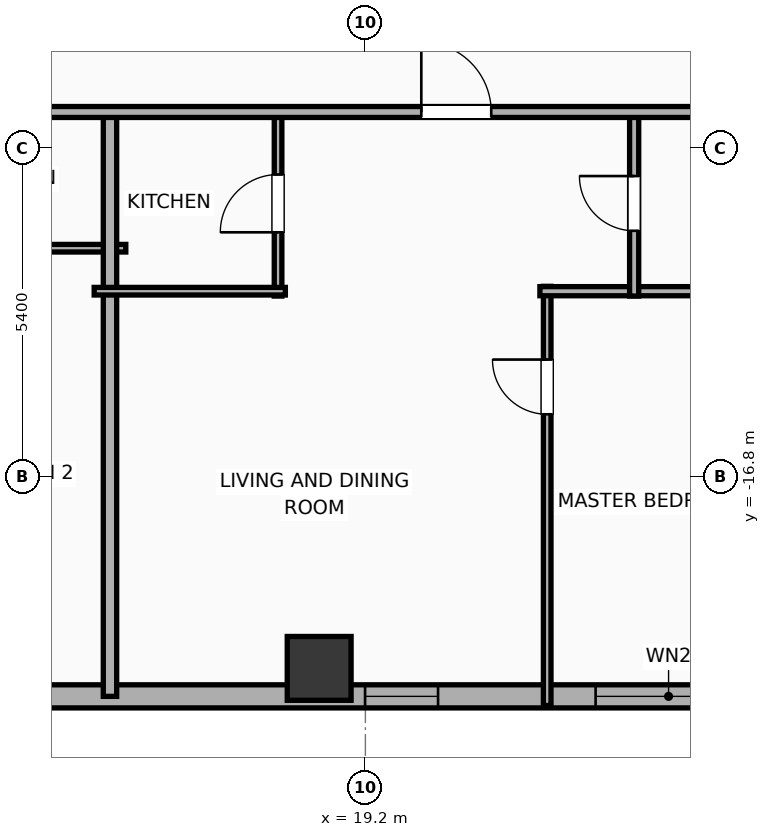
"""IFC4 building model, lengths in metres.
Left out: names, types, materials, properties, quantities, classifications, styles, units other than length and angle.
Written with IfcOpenShell. Run it as: python <this file> out.ifc"""

import sys

from ifc_helpers import new_model, si_unit, direction, frame, frame_2d, origin, origin_2d, place, context, subcontext, project, spatial, rectangle, hollow_rectangle, extrude, element, fill, save


model = new_model("IFC4")
c1 = context("Model", 3, precision=1e-05, world=origin(), true_north=direction((0.0, 1.0)))
c2 = subcontext(c1, "Body", "Model", "MODEL_VIEW")
j1 = project(units=[si_unit("LENGTHUNIT", "METRE"), si_unit("PLANEANGLEUNIT", "RADIAN")], contexts=[c1])
p1 = place(None, origin())
s1 = spatial("IfcSite", under=j1, at=p1, CompositionType="ELEMENT")
p2 = place(p1, origin())
s2 = spatial("IfcBuilding", under=s1, at=p2, CompositionType="ELEMENT")
p3 = place(p2, frame((0.0, 0.0, 109.2)))
s3 = spatial("IfcBuildingStorey", under=s2, at=p3, CompositionType="ELEMENT", Elevation=109.2)
p4 = place(p3, frame((18.44, -19.95, 0.0), z_axis=(0.0, 0.0, 1.0), x_axis=(1.0, 0.0, 0.0)))
e1 = element("IfcColumn", 1, at=p4, inside=s3, PredefinedType="COLUMN", context=c2, shape_type="SweptSolid", body=[
    extrude(hollow_rectangle(XDim=1.05, YDim=1.05, WallThickness=0.036, at=origin_2d()), origin(), (0.0, 0.0, 1.0), 3.9),
])
p5 = place(p3, frame((29.381, -20.41, 0.0), z_axis=(0.0, 0.0, 1.0), x_axis=(-1.0, 0.0, 0.0)))
e2 = element("IfcWall", 2, at=p5, inside=s3, PredefinedType="ELEMENTEDWALL", context=c2, shape_type="SweptSolid", body=[
    extrude(rectangle(XDim=54.763, YDim=0.38, at=frame_2d((27.381, 0.0))), origin(), (0.0, 0.0, 1.0), 3.65),
])
p6 = place(p5, frame((3.995, 0.0, 0.75)))
e3 = element("IfcOpeningElement", 3, at=p6, cuts=e2, PredefinedType="OPENING", context=c2, shape_type="SweptSolid", body=[
    extrude(rectangle(XDim=2.4, YDim=2.1, at=frame_2d((1.2, 1.05))), frame((0.0, 0.2, 0.0), z_axis=(0.0, -1.0, 0.0), x_axis=(1.0, 0.0, 0.0)), (0.0, 0.0, 1.0), 0.4),
])
p7 = place(p5, frame((18.486, 0.0, 0.75)))
e4 = element("IfcOpeningElement", 4, at=p7, cuts=e2, PredefinedType="OPENING", context=c2, shape_type="SweptSolid", body=[
    extrude(rectangle(XDim=2.4, YDim=2.1, at=frame_2d((1.2, 1.05))), frame((0.0, 0.2, 0.0), z_axis=(0.0, -1.0, 0.0), x_axis=(1.0, 0.0, 0.0)), (0.0, 0.0, 1.0), 0.4),
])
p8 = place(p5, frame((46.717, 0.0, 0.75)))
e5 = element("IfcOpeningElement", 5, at=p8, cuts=e2, PredefinedType="OPENING", context=c2, shape_type="SweptSolid", body=[
    extrude(rectangle(XDim=2.4, YDim=2.1, at=frame_2d((1.2, 1.05))), frame((0.0, 0.2, 0.0), z_axis=(0.0, -1.0, 0.0), x_axis=(1.0, 0.0, 0.0)), (0.0, 0.0, 1.0), 0.4),
])
p9 = place(p5, frame((52.651, 0.0, 0.75)))
e6 = element("IfcOpeningElement", 6, at=p9, cuts=e2, PredefinedType="OPENING", context=c2, shape_type="SweptSolid", body=[
    extrude(rectangle(XDim=1.2, YDim=2.05, at=frame_2d((0.6, 1.025))), frame((0.0, 0.2, 0.0), z_axis=(0.0, -1.0, 0.0), x_axis=(1.0, 0.0, 0.0)), (0.0, 0.0, 1.0), 0.4),
])
p10 = place(p5, frame((50.521, 0.0, 0.75)))
e7 = element("IfcOpeningElement", 7, at=p10, cuts=e2, PredefinedType="OPENING", context=c2, shape_type="SweptSolid", body=[
    extrude(rectangle(XDim=1.2, YDim=2.05, at=frame_2d((0.6, 1.025))), frame((0.0, 0.2, 0.0), z_axis=(0.0, -1.0, 0.0), x_axis=(1.0, 0.0, 0.0)), (0.0, 0.0, 1.0), 0.4),
])
p11 = place(p5, frame((40.191, 0.0, 0.75)))
e8 = element("IfcOpeningElement", 8, at=p11, cuts=e2, PredefinedType="OPENING", context=c2, shape_type="SweptSolid", body=[
    extrude(rectangle(XDim=1.2, YDim=2.05, at=frame_2d((0.6, 1.025))), frame((0.0, 0.2, 0.0), z_axis=(0.0, -1.0, 0.0), x_axis=(1.0, 0.0, 0.0)), (0.0, 0.0, 1.0), 0.4),
])
p12 = place(p5, frame((44.631, 0.0, 0.75)))
e9 = element("IfcOpeningElement", 9, at=p12, cuts=e2, PredefinedType="OPENING", context=c2, shape_type="SweptSolid", body=[
    extrude(rectangle(XDim=1.2, YDim=2.05, at=frame_2d((0.6, 1.025))), frame((0.0, 0.2, 0.0), z_axis=(0.0, -1.0, 0.0), x_axis=(1.0, 0.0, 0.0)), (0.0, 0.0, 1.0), 0.4),
])
p13 = place(p5, frame((36.561, 0.0, 0.75)))
e10 = element("IfcOpeningElement", 10, at=p13, cuts=e2, PredefinedType="OPENING", context=c2, shape_type="SweptSolid", body=[
    extrude(rectangle(XDim=1.2, YDim=2.05, at=frame_2d((0.6, 1.025))), frame((0.0, 0.2, 0.0), z_axis=(0.0, -1.0, 0.0), x_axis=(1.0, 0.0, 0.0)), (0.0, 0.0, 1.0), 0.4),
])
p14 = place(p5, frame((30.004, 0.0, 0.75)))
e11 = element("IfcOpeningElement", 11, at=p14, cuts=e2, PredefinedType="OPENING", context=c2, shape_type="SweptSolid", body=[
    extrude(rectangle(XDim=1.2, YDim=2.05, at=frame_2d((0.6, 1.025))), frame((0.0, 0.2, 0.0), z_axis=(0.0, -1.0, 0.0), x_axis=(1.0, 0.0, 0.0)), (0.0, 0.0, 1.0), 0.4),
])
p15 = place(p5, frame((33.599, 0.0, 0.75)))
e12 = element("IfcOpeningElement", 12, at=p15, cuts=e2, PredefinedType="OPENING", context=c2, shape_type="SweptSolid", body=[
    extrude(rectangle(XDim=1.2, YDim=2.05, at=frame_2d((0.6, 1.025))), frame((0.0, 0.2, 0.0), z_axis=(0.0, -1.0, 0.0), x_axis=(1.0, 0.0, 0.0)), (0.0, 0.0, 1.0), 0.4),
])
p16 = place(p5, frame((26.086, 0.0, 0.75)))
e13 = element("IfcOpeningElement", 13, at=p16, cuts=e2, PredefinedType="OPENING", context=c2, shape_type="SweptSolid", body=[
    extrude(rectangle(XDim=1.2, YDim=2.05, at=frame_2d((0.6, 1.025))), frame((0.0, 0.2, 0.0), z_axis=(0.0, -1.0, 0.0), x_axis=(1.0, 0.0, 0.0)), (0.0, 0.0, 1.0), 0.4),
])
p17 = place(p5, frame((22.626, 0.0, 0.75)))
e14 = element("IfcOpeningElement", 14, at=p17, cuts=e2, PredefinedType="OPENING", context=c2, shape_type="SweptSolid", body=[
    extrude(rectangle(XDim=1.2, YDim=2.05, at=frame_2d((0.6, 1.025))), frame((0.0, 0.2, 0.0), z_axis=(0.0, -1.0, 0.0), x_axis=(1.0, 0.0, 0.0)), (0.0, 0.0, 1.0), 0.4),
])
p18 = place(p5, frame((15.361, 0.0, 0.75)))
e15 = element("IfcOpeningElement", 15, at=p18, cuts=e2, PredefinedType="OPENING", context=c2, shape_type="SweptSolid", body=[
    extrude(rectangle(XDim=1.2, YDim=2.05, at=frame_2d((0.6, 1.025))), frame((0.0, 0.2, 0.0), z_axis=(0.0, -1.0, 0.0), x_axis=(1.0, 0.0, 0.0)), (0.0, 0.0, 1.0), 0.4),
])
p19 = place(p5, frame((8.986, 0.0, 0.75)))
e16 = element("IfcOpeningElement", 16, at=p19, cuts=e2, PredefinedType="OPENING", context=c2, shape_type="SweptSolid", body=[
    extrude(rectangle(XDim=1.2, YDim=2.05, at=frame_2d((0.6, 1.025))), frame((0.0, 0.2, 0.0), z_axis=(0.0, -1.0, 0.0), x_axis=(1.0, 0.0, 0.0)), (0.0, 0.0, 1.0), 0.4),
])
p20 = place(p5, frame((1.736, 0.0, 0.75)))
e17 = element("IfcOpeningElement", 17, at=p20, cuts=e2, PredefinedType="OPENING", context=c2, shape_type="SweptSolid", body=[
    extrude(rectangle(XDim=1.2, YDim=2.05, at=frame_2d((0.6, 1.025))), frame((0.0, 0.2, 0.0), z_axis=(0.0, -1.0, 0.0), x_axis=(1.0, 0.0, 0.0)), (0.0, 0.0, 1.0), 0.4),
])
p21 = place(p3, frame((11.76, -13.04, 0.0), z_axis=(0.0, 0.0, 1.0), x_axis=(1.0, 0.0, 0.0)))
e18 = element("IfcWall", 18, at=p21, inside=s3, PredefinedType="PARTITIONING", context=c2, shape_type="SweptSolid", body=[
    extrude(rectangle(XDim=3.5, YDim=0.125, at=frame_2d((1.75, 0.0))), origin(), (0.0, 0.0, 1.0), 3.65),
])
p22 = place(p3, frame((15.0, -20.41, 0.0), z_axis=(0.0, 0.0, 1.0), x_axis=(0.0, 1.0, 0.0)))
e19 = element("IfcWall", 19, at=p22, inside=s3, PredefinedType="PARTITIONING", context=c2, shape_type="SweptSolid", body=[
    extrude(rectangle(XDim=9.69, YDim=0.22, at=frame_2d((4.845, 0.0))), origin(), (0.0, 0.0, 1.0), 3.65),
])
p23 = place(p3, frame((22.19, -20.56, 0.0), z_axis=(0.0, 0.0, 1.0), x_axis=(0.0, 1.0, 0.0)))
e20 = element("IfcWall", 20, at=p23, inside=s3, PredefinedType="PARTITIONING", context=c2, shape_type="SweptSolid", body=[
    extrude(rectangle(XDim=6.893, YDim=0.125, at=frame_2d((3.447, 0.0))), origin(), (0.0, 0.0, 1.0), 3.65),
])
p24 = place(p23, frame((4.789, 0.0, 0.0)))
e21 = element("IfcOpeningElement", 21, at=p24, cuts=e20, PredefinedType="OPENING", context=c2, shape_type="SweptSolid", body=[
    extrude(rectangle(XDim=0.9, YDim=2.05, at=frame_2d((0.45, 1.025))), frame((0.0, 0.073, 0.0), z_axis=(0.0, -1.0, 0.0), x_axis=(1.0, 0.0, 0.0)), (0.0, 0.0, 1.0), 0.145),
])
p25 = place(p3, frame((22.07, -13.747, 0.0), z_axis=(0.0, 0.0, 1.0), x_axis=(1.0, 0.0, 0.0)))
e22 = element("IfcWall", 22, at=p25, inside=s3, PredefinedType="PLUMBINGWALL", context=c2, shape_type="SweptSolid", body=[
    extrude(rectangle(XDim=3.79, YDim=0.15, at=frame_2d((1.895, 0.0))), origin(), (0.0, 0.0, 1.0), 3.65),
])
p26 = place(p3, frame((17.764, -13.827, 0.0), z_axis=(0.0, 0.0, 1.0), x_axis=(0.0, 1.0, 0.0)))
e23 = element("IfcWall", 23, at=p26, inside=s3, PredefinedType="PARTITIONING", context=c2, shape_type="SweptSolid", body=[
    extrude(rectangle(XDim=3.047, YDim=0.125, at=frame_2d((1.523, 0.0))), origin(), (0.0, 0.0, 1.0), 3.65),
])
p27 = place(p26, frame((1.049, 0.0, 0.0)))
e24 = element("IfcOpeningElement", 24, at=p27, cuts=e23, PredefinedType="OPENING", context=c2, shape_type="SweptSolid", body=[
    extrude(rectangle(XDim=0.95, YDim=2.05, at=frame_2d((0.475, 1.025))), frame((0.0, 0.073, 0.0), z_axis=(0.0, -1.0, 0.0), x_axis=(1.0, 0.0, 0.0)), (0.0, 0.0, 1.0), 0.145),
])
p28 = place(p3, frame((14.74, -13.747, 0.0), z_axis=(0.0, 0.0, 1.0), x_axis=(1.0, 0.0, 0.0)))
e25 = element("IfcWall", 25, at=p28, inside=s3, PredefinedType="PARTITIONING", context=c2, shape_type="SweptSolid", body=[
    extrude(rectangle(XDim=3.144, YDim=0.125, at=frame_2d((1.572, 0.0))), origin(), (0.0, 0.0, 1.0), 3.65),
])
p29 = place(p3, frame((23.62, -13.827, 0.0), z_axis=(0.0, 0.0, 1.0), x_axis=(0.0, 1.0, 0.0)))
e26 = element("IfcWall", 26, at=p29, inside=s3, PredefinedType="PLUMBINGWALL", context=c2, shape_type="SweptSolid", body=[
    extrude(rectangle(XDim=3.047, YDim=0.15, at=frame_2d((1.523, 0.0))), origin(), (0.0, 0.0, 1.0), 3.65),
])
p30 = place(p29, frame((1.073, 0.0, 0.0)))
e27 = element("IfcOpeningElement", 27, at=p30, cuts=e26, PredefinedType="OPENING", context=c2, shape_type="SweptSolid", body=[
    extrude(rectangle(XDim=0.9, YDim=2.05, at=frame_2d((0.45, 1.025))), frame((0.0, 0.085, 0.0), z_axis=(0.0, -1.0, 0.0), x_axis=(1.0, 0.0, 0.0)), (0.0, 0.0, 1.0), 0.17),
])
p31 = place(p3, frame((-29.21, -10.8, 0.0), z_axis=(0.0, 0.0, 1.0), x_axis=(1.0, 0.0, 0.0)))
e28 = element("IfcWall", 28, at=p31, inside=s3, PredefinedType="PARTITIONING", context=c2, shape_type="SweptSolid", body=[
    extrude(rectangle(XDim=62.42, YDim=0.18, at=frame_2d((31.21, 0.0))), origin(), (0.0, 0.0, 1.0), 3.65),
])
p32 = place(p31, frame((2.74, 0.0, 0.0)))
e29 = element("IfcOpeningElement", 29, at=p32, cuts=e28, PredefinedType="OPENING", context=c2, shape_type="SweptSolid", body=[
    extrude(rectangle(XDim=0.9, YDim=2.05, at=frame_2d((0.45, 1.025))), frame((0.0, 0.1, 0.0), z_axis=(0.0, -1.0, 0.0), x_axis=(1.0, 0.0, 0.0)), (0.0, 0.0, 1.0), 0.2),
])
p33 = place(p31, frame((9.968, 0.0, 0.0)))
e30 = element("IfcOpeningElement", 30, at=p33, cuts=e28, PredefinedType="OPENING", context=c2, shape_type="SweptSolid", body=[
    extrude(rectangle(XDim=1.15, YDim=2.05, at=frame_2d((0.575, 1.025))), frame((0.0, 0.1, 0.0), z_axis=(0.0, -1.0, 0.0), x_axis=(1.0, 0.0, 0.0)), (0.0, 0.0, 1.0), 0.2),
])
p34 = place(p31, frame((17.227, 0.0, 0.0)))
e31 = element("IfcOpeningElement", 31, at=p34, cuts=e28, PredefinedType="OPENING", context=c2, shape_type="SweptSolid", body=[
    extrude(rectangle(XDim=1.15, YDim=2.05, at=frame_2d((0.575, 1.025))), frame((0.0, 0.1, 0.0), z_axis=(0.0, -1.0, 0.0), x_axis=(1.0, 0.0, 0.0)), (0.0, 0.0, 1.0), 0.2),
])
p35 = place(p31, frame((28.157, 0.0, 0.0)))
e32 = element("IfcOpeningElement", 32, at=p35, cuts=e28, PredefinedType="OPENING", context=c2, shape_type="SweptSolid", body=[
    extrude(rectangle(XDim=1.15, YDim=2.05, at=frame_2d((0.575, 1.025))), frame((0.0, 0.1, 0.0), z_axis=(0.0, -1.0, 0.0), x_axis=(1.0, 0.0, 0.0)), (0.0, 0.0, 1.0), 0.2),
])
p36 = place(p31, frame((38.512, 0.0, 0.0)))
e33 = element("IfcOpeningElement", 33, at=p36, cuts=e28, PredefinedType="OPENING", context=c2, shape_type="SweptSolid", body=[
    extrude(rectangle(XDim=1.15, YDim=2.05, at=frame_2d((0.575, 1.025))), frame((0.0, 0.1, 0.0), z_axis=(0.0, -1.0, 0.0), x_axis=(1.0, 0.0, 0.0)), (0.0, 0.0, 1.0), 0.2),
])
p37 = place(p31, frame((49.33, 0.0, 0.0)))
e34 = element("IfcOpeningElement", 34, at=p37, cuts=e28, PredefinedType="OPENING", context=c2, shape_type="SweptSolid", body=[
    extrude(rectangle(XDim=1.15, YDim=2.05, at=frame_2d((0.575, 1.025))), frame((0.0, 0.1, 0.0), z_axis=(0.0, -1.0, 0.0), x_axis=(1.0, 0.0, 0.0)), (0.0, 0.0, 1.0), 0.2),
])
p38 = place(p31, frame((58.237, 0.0, 0.0)))
e35 = element("IfcOpeningElement", 35, at=p38, cuts=e28, PredefinedType="OPENING", context=c2, shape_type="SweptSolid", body=[
    extrude(rectangle(XDim=1.15, YDim=2.05, at=frame_2d((0.575, 1.025))), frame((0.0, 0.1, 0.0), z_axis=(0.0, -1.0, 0.0), x_axis=(1.0, 0.0, 0.0)), (0.0, 0.0, 1.0), 0.2),
])
p39 = place(p6, origin())
e36 = element("IfcWindow", 36, at=p39, inside=s3, PartitioningType="SINGLE_PANEL", PredefinedType="WINDOW", context=c2, shape_type="SweptSolid", body=[
    extrude(rectangle(XDim=2.4, YDim=2.1, at=frame_2d((1.2, 1.05))), frame((0.0, 0.03, 0.0), z_axis=(0.0, -1.0, 0.0), x_axis=(1.0, 0.0, 0.0)), (0.0, 0.0, 1.0), 0.06),
])
fill(e3, e36)
p40 = place(p19, origin())
e37 = element("IfcWindow", 37, at=p40, inside=s3, PartitioningType="SINGLE_PANEL", PredefinedType="WINDOW", context=c2, shape_type="SweptSolid", body=[
    extrude(rectangle(XDim=1.2, YDim=2.05, at=frame_2d((0.6, 1.025))), frame((0.0, 0.03, 0.0), z_axis=(0.0, -1.0, 0.0), x_axis=(1.0, 0.0, 0.0)), (0.0, 0.0, 1.0), 0.06),
])
fill(e16, e37)
p41 = place(p24, origin())
e38 = element("IfcDoor", 38, at=p41, inside=s3, OperationType="SINGLE_SWING_RIGHT", PredefinedType="DOOR", context=c2, shape_type="SweptSolid", body=[
    extrude(rectangle(XDim=0.9, YDim=2.05, at=frame_2d((0.45, 1.025))), frame((0.0, 0.025, 0.0), z_axis=(0.0, -1.0, 0.0), x_axis=(1.0, 0.0, 0.0)), (0.0, 0.0, 1.0), 0.05),
])
fill(e21, e38)
p42 = place(p27, origin())
e39 = element("IfcDoor", 39, at=p42, inside=s3, OperationType="SINGLE_SWING_LEFT", PredefinedType="DOOR", context=c2, shape_type="SweptSolid", body=[
    extrude(rectangle(XDim=0.95, YDim=2.05, at=frame_2d((0.475, 1.025))), frame((0.0, 0.025, 0.0), z_axis=(0.0, -1.0, 0.0), x_axis=(1.0, 0.0, 0.0)), (0.0, 0.0, 1.0), 0.05),
])
fill(e24, e39)
p43 = place(p30, origin())
e40 = element("IfcDoor", 40, at=p43, inside=s3, OperationType="SINGLE_SWING_RIGHT", PredefinedType="DOOR", context=c2, shape_type="SweptSolid", body=[
    extrude(rectangle(XDim=0.9, YDim=2.05, at=frame_2d((0.45, 1.025))), frame((0.0, 0.025, 0.0), z_axis=(0.0, -1.0, 0.0), x_axis=(1.0, 0.0, 0.0)), (0.0, 0.0, 1.0), 0.05),
])
fill(e27, e40)
p44 = place(p37, origin())
e41 = element("IfcDoor", 41, at=p44, inside=s3, OperationType="SINGLE_SWING_LEFT", PredefinedType="DOOR", context=c2, shape_type="SweptSolid", body=[
    extrude(rectangle(XDim=1.15, YDim=2.05, at=frame_2d((0.575, 1.025))), frame((0.0, 0.025, 0.0), z_axis=(0.0, -1.0, 0.0), x_axis=(1.0, 0.0, 0.0)), (0.0, 0.0, 1.0), 0.05),
])
fill(e34, e41)
save(model, sys.argv[1])
